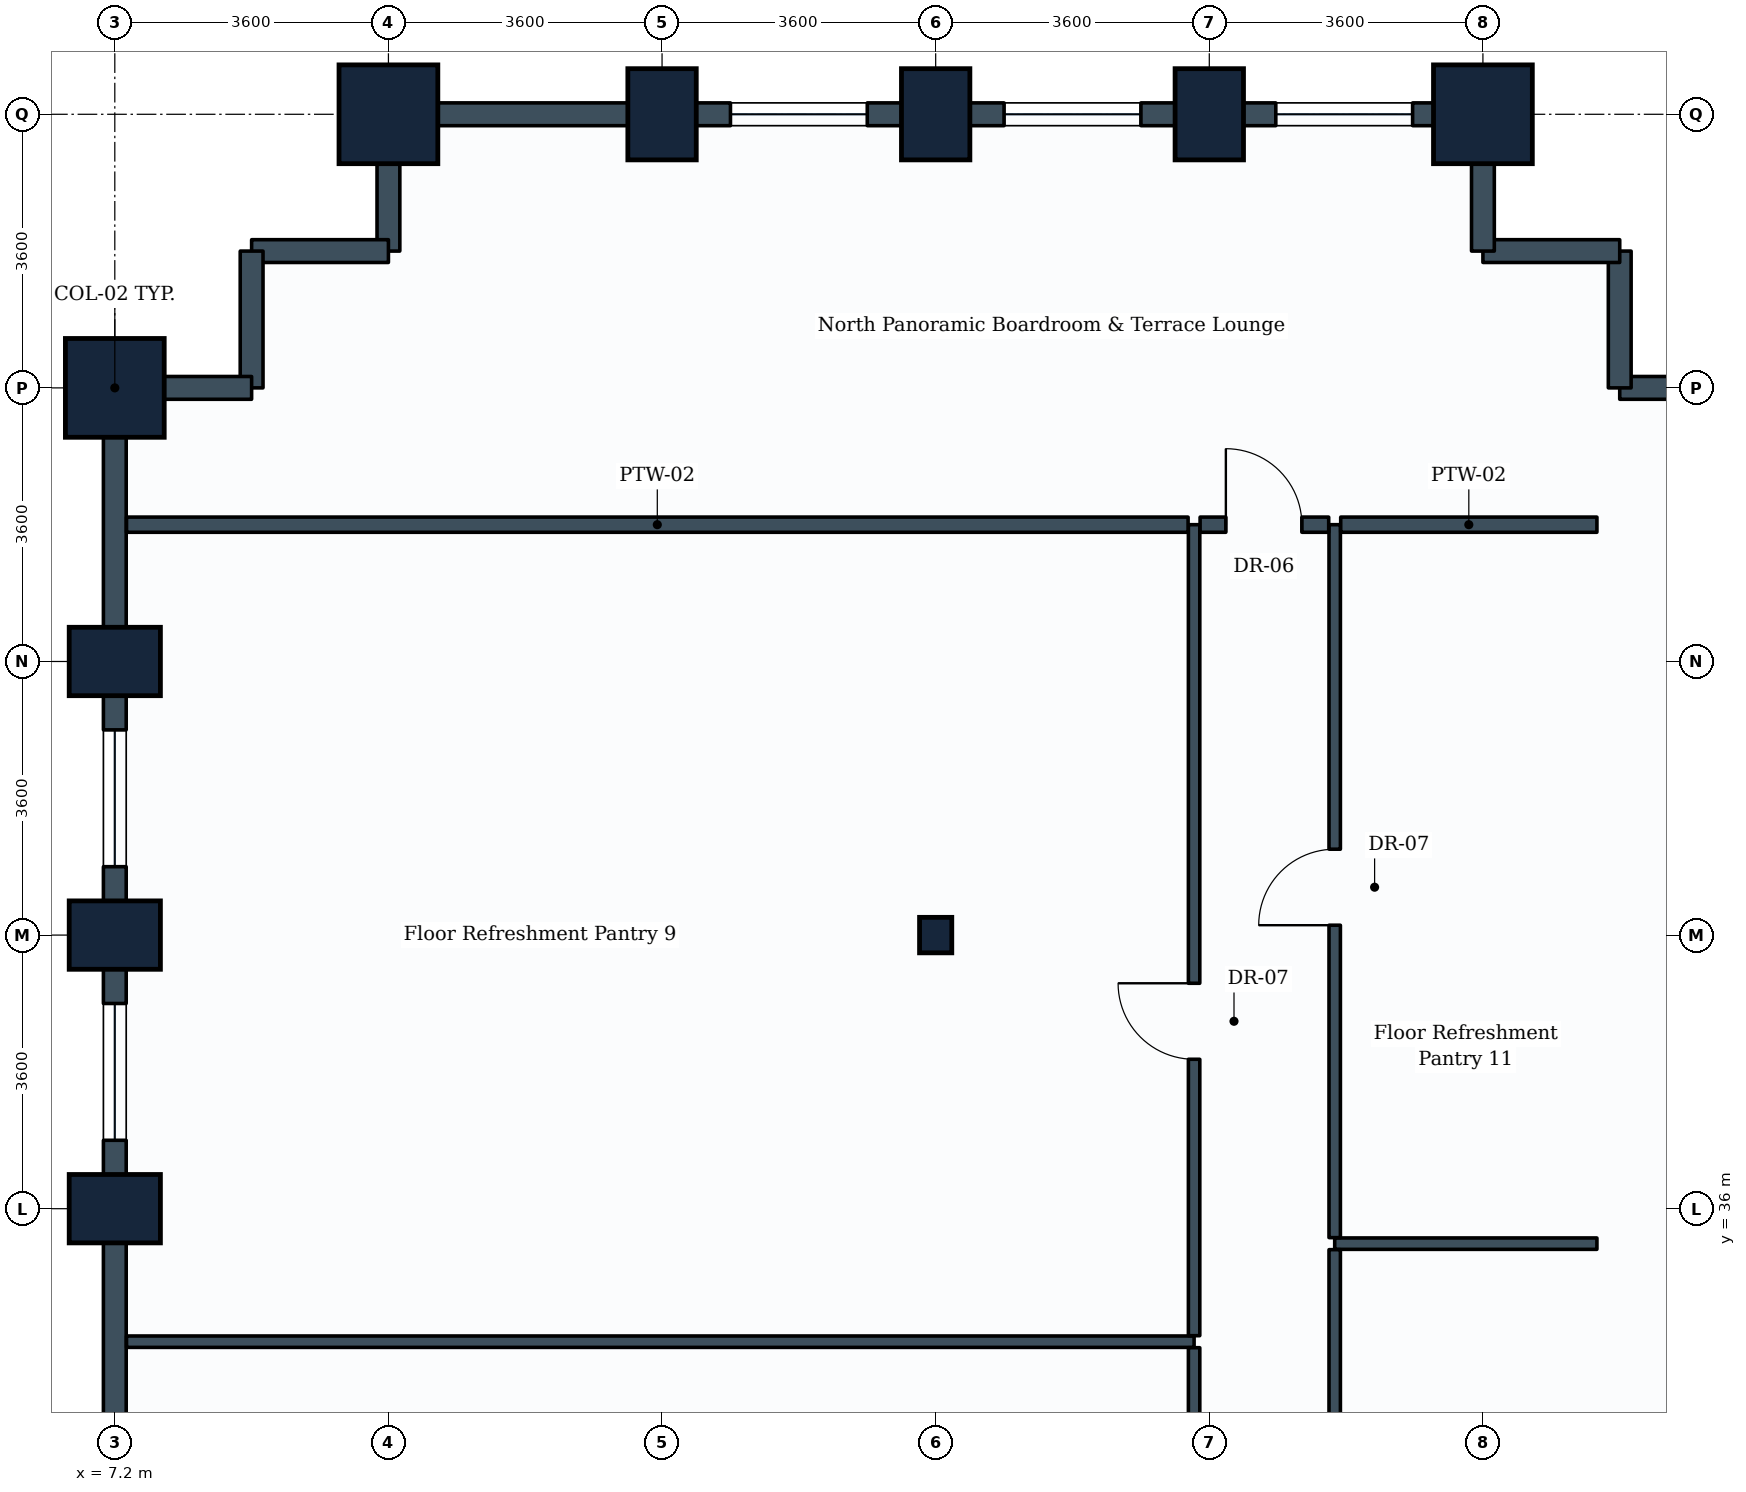
"""IFC4 building model, lengths in metres.
Left out: names, types, materials, properties, quantities, classifications, styles, units other than length and angle.
Written with IfcOpenShell. Run it as: python <this file> out.ifc"""

import sys

from ifc_helpers import new_model, si_unit, direction, frame, frame_2d, origin, origin_2d, place, context, subcontext, project, spatial, rectangle, i_section, extrude, element, fill, save


model = new_model("IFC4")
c1 = context("Model", 3, precision=1e-05, world=origin(), true_north=direction((0.0, 1.0)))
c2 = subcontext(c1, "Body", "Model", "MODEL_VIEW")
j1 = project(units=[si_unit("LENGTHUNIT", "METRE"), si_unit("PLANEANGLEUNIT", "RADIAN")], contexts=[c1])
p1 = place(None, origin())
s1 = spatial("IfcSite", under=j1, at=p1, CompositionType="ELEMENT")
p2 = place(p1, origin())
s2 = spatial("IfcBuilding", under=s1, at=p2, CompositionType="ELEMENT")
p3 = place(p2, frame((0.0, 0.0, 39.6)))
s3 = spatial("IfcBuildingStorey", under=s2, at=p3, CompositionType="ELEMENT", Elevation=39.6)
for number, where, z_axis, x_axis in (
    (1, (7.2, 36.0, 0.0), (0.0, 0.0, 1.0), (0.0, 1.0, 0.0)),
    (2, (7.2, 39.6, 0.0), (0.0, 0.0, 1.0), (0.0, 1.0, 0.0)),
    (3, (7.2, 43.2, 0.0), (0.0, 0.0, 1.0), (0.0, 1.0, 0.0)),
):
    element("IfcColumn", number, at=place(p3, frame(where, z_axis=z_axis, x_axis=x_axis)), inside=s3, PredefinedType="COLUMN", context=c2, shape_type="SweptSolid", body=[
        extrude(rectangle(XDim=0.9, YDim=1.2, at=origin_2d()), origin(), (0.0, 0.0, 1.0), 3.9),
    ])
for number, where, z_axis, x_axis in (
    (4, (7.2, 46.8, 0.0), (0.0, 0.0, 1.0), (0.0, 1.0, 0.0)),
    (5, (10.8, 50.4, 0.0), (0.0, 0.0, 1.0), (1.0, 0.0, 0.0)),
):
    element("IfcColumn", number, at=place(p3, frame(where, z_axis=z_axis, x_axis=x_axis)), inside=s3, PredefinedType="COLUMN", context=c2, shape_type="SweptSolid", body=[
        extrude(rectangle(XDim=1.3, YDim=1.3, at=origin_2d()), origin(), (0.0, 0.0, 1.0), 3.9),
    ])
p4 = place(p3, frame((14.4, 50.4, 0.0), z_axis=(0.0, 0.0, 1.0), x_axis=(1.0, 0.0, 0.0)))
e6 = element("IfcColumn", 6, at=p4, inside=s3, PredefinedType="COLUMN", context=c2, shape_type="SweptSolid", body=[
    extrude(rectangle(XDim=0.9, YDim=1.2, at=origin_2d()), origin(), (0.0, 0.0, 1.0), 3.9),
])
p5 = place(p3, frame((18.0, 39.6, 0.0), z_axis=(0.0, 0.0, 1.0), x_axis=(1.0, 0.0, 0.0)))
e7 = element("IfcColumn", 7, at=p5, inside=s3, PredefinedType="COLUMN", context=c2, shape_type="SweptSolid", body=[
    extrude(i_section(OverallWidth=0.424, OverallDepth=0.467, WebThickness=0.033, FlangeThickness=0.053, FilletRadius=0.015, at=origin_2d()), origin(), (0.0, 0.0, 1.0), 3.9),
])
for number, where, z_axis, x_axis in (
    (8, (18.0, 50.4, 0.0), (0.0, 0.0, 1.0), (1.0, 0.0, 0.0)),
    (9, (21.6, 50.4, 0.0), (0.0, 0.0, 1.0), (1.0, 0.0, 0.0)),
):
    element("IfcColumn", number, at=place(p3, frame(where, z_axis=z_axis, x_axis=x_axis)), inside=s3, PredefinedType="COLUMN", context=c2, shape_type="SweptSolid", body=[
        extrude(rectangle(XDim=0.9, YDim=1.2, at=origin_2d()), origin(), (0.0, 0.0, 1.0), 3.9),
    ])
p6 = place(p3, frame((25.2, 50.4, 0.0), z_axis=(0.0, 0.0, 1.0), x_axis=(1.0, 0.0, 0.0)))
e10 = element("IfcColumn", 10, at=p6, inside=s3, PredefinedType="COLUMN", context=c2, shape_type="SweptSolid", body=[
    extrude(rectangle(XDim=1.3, YDim=1.3, at=origin_2d()), origin(), (0.0, 0.0, 1.0), 3.9),
])
p7 = place(p3, frame((27.0, 46.8, 0.0), z_axis=(0.0, 0.0, 1.0), x_axis=(1.0, 0.0, 0.0)))
e11 = element("IfcWall", 11, at=p7, inside=s3, PredefinedType="STANDARD", context=c2, shape_type="SweptSolid", body=[
    extrude(rectangle(XDim=1.8, YDim=0.3, at=frame_2d((0.9, 0.0))), origin(), (0.0, 0.0, 1.0), 2.93),
])
for number, where, z_axis, x_axis in (
    (12, (27.0, 46.8, 0.0), (0.0, 0.0, 1.0), (0.0, 1.0, 0.0)),
    (13, (25.2, 48.6, 0.0), (0.0, 0.0, 1.0), (1.0, 0.0, 0.0)),
):
    element("IfcWall", number, at=place(p3, frame(where, z_axis=z_axis, x_axis=x_axis)), inside=s3, PredefinedType="STANDARD", context=c2, shape_type="SweptSolid", body=[
        extrude(rectangle(XDim=1.8, YDim=0.3, at=frame_2d((0.9, 0.0))), origin(), (0.0, 0.0, 1.0), 3.635),
    ])
p8 = place(p3, frame((25.2, 48.6, 0.0), z_axis=(0.0, 0.0, 1.0), x_axis=(0.0, 1.0, 0.0)))
e14 = element("IfcWall", 14, at=p8, inside=s3, PredefinedType="STANDARD", context=c2, shape_type="SweptSolid", body=[
    extrude(rectangle(XDim=1.8, YDim=0.3, at=frame_2d((0.9, 0.0))), origin(), (0.0, 0.0, 1.0), 2.93),
])
p9 = place(p3, frame((21.6, 50.4, 0.0), z_axis=(0.0, 0.0, 1.0), x_axis=(1.0, 0.0, 0.0)))
e15 = element("IfcWall", 15, at=p9, inside=s3, PredefinedType="STANDARD", context=c2, shape_type="SweptSolid", body=[
    extrude(rectangle(XDim=3.6, YDim=0.3, at=frame_2d((1.8, 0.0))), origin(), (0.0, 0.0, 1.0), 2.93),
])
p10 = place(p9, frame((0.875, 0.0, 0.85)))
e16 = element("IfcOpeningElement", 16, at=p10, cuts=e15, PredefinedType="OPENING", context=c2, shape_type="SweptSolid", body=[
    extrude(rectangle(XDim=1.8, YDim=1.35, at=frame_2d((0.9, 0.675))), frame((0.0, 0.16, 0.0), z_axis=(0.0, -1.0, 0.0), x_axis=(1.0, 0.0, 0.0)), (0.0, 0.0, 1.0), 0.32),
])
p11 = place(p3, frame((18.0, 50.4, 0.0), z_axis=(0.0, 0.0, 1.0), x_axis=(1.0, 0.0, 0.0)))
e17 = element("IfcWall", 17, at=p11, inside=s3, PredefinedType="STANDARD", context=c2, shape_type="SweptSolid", body=[
    extrude(rectangle(XDim=3.6, YDim=0.3, at=frame_2d((1.8, 0.0))), origin(), (0.0, 0.0, 1.0), 2.93),
])
p12 = place(p11, frame((0.9, 0.0, 0.85)))
e18 = element("IfcOpeningElement", 18, at=p12, cuts=e17, PredefinedType="OPENING", context=c2, shape_type="SweptSolid", body=[
    extrude(rectangle(XDim=1.8, YDim=1.35, at=frame_2d((0.9, 0.675))), frame((0.0, 0.16, 0.0), z_axis=(0.0, -1.0, 0.0), x_axis=(1.0, 0.0, 0.0)), (0.0, 0.0, 1.0), 0.32),
])
p13 = place(p3, frame((14.4, 50.4, 0.0), z_axis=(0.0, 0.0, 1.0), x_axis=(1.0, 0.0, 0.0)))
e19 = element("IfcWall", 19, at=p13, inside=s3, PredefinedType="STANDARD", context=c2, shape_type="SweptSolid", body=[
    extrude(rectangle(XDim=3.6, YDim=0.3, at=frame_2d((1.8, 0.0))), origin(), (0.0, 0.0, 1.0), 2.93),
])
p14 = place(p13, frame((0.9, 0.0, 0.85)))
e20 = element("IfcOpeningElement", 20, at=p14, cuts=e19, PredefinedType="OPENING", context=c2, shape_type="SweptSolid", body=[
    extrude(rectangle(XDim=1.8, YDim=1.35, at=frame_2d((0.9, 0.675))), frame((0.0, 0.16, 0.0), z_axis=(0.0, -1.0, 0.0), x_axis=(1.0, 0.0, 0.0)), (0.0, 0.0, 1.0), 0.32),
])
p15 = place(p3, frame((10.8, 50.4, 0.0), z_axis=(0.0, 0.0, 1.0), x_axis=(1.0, 0.0, 0.0)))
e21 = element("IfcWall", 21, at=p15, inside=s3, PredefinedType="STANDARD", context=c2, shape_type="SweptSolid", body=[
    extrude(rectangle(XDim=3.6, YDim=0.3, at=frame_2d((1.8, 0.0))), origin(), (0.0, 0.0, 1.0), 2.93),
])
p16 = place(p3, frame((10.8, 48.6, 0.0), z_axis=(0.0, 0.0, 1.0), x_axis=(0.0, 1.0, 0.0)))
e22 = element("IfcWall", 22, at=p16, inside=s3, PredefinedType="STANDARD", context=c2, shape_type="SweptSolid", body=[
    extrude(rectangle(XDim=1.8, YDim=0.3, at=frame_2d((0.9, 0.0))), origin(), (0.0, 0.0, 1.0), 2.93),
])
for number, where, z_axis, x_axis in (
    (23, (9.0, 48.6, 0.0), (0.0, 0.0, 1.0), (1.0, 0.0, 0.0)),
    (24, (9.0, 46.8, 0.0), (0.0, 0.0, 1.0), (0.0, 1.0, 0.0)),
):
    element("IfcWall", number, at=place(p3, frame(where, z_axis=z_axis, x_axis=x_axis)), inside=s3, PredefinedType="STANDARD", context=c2, shape_type="SweptSolid", body=[
        extrude(rectangle(XDim=1.8, YDim=0.3, at=frame_2d((0.9, 0.0))), origin(), (0.0, 0.0, 1.0), 3.635),
    ])
p17 = place(p3, frame((7.2, 46.8, 0.0), z_axis=(0.0, 0.0, 1.0), x_axis=(1.0, 0.0, 0.0)))
e25 = element("IfcWall", 25, at=p17, inside=s3, PredefinedType="STANDARD", context=c2, shape_type="SweptSolid", body=[
    extrude(rectangle(XDim=1.8, YDim=0.3, at=frame_2d((0.9, 0.0))), origin(), (0.0, 0.0, 1.0), 2.93),
])
p18 = place(p3, frame((7.2, 43.2, 0.0), z_axis=(0.0, 0.0, 1.0), x_axis=(0.0, 1.0, 0.0)))
e26 = element("IfcWall", 26, at=p18, inside=s3, PredefinedType="STANDARD", context=c2, shape_type="SweptSolid", body=[
    extrude(rectangle(XDim=3.6, YDim=0.3, at=frame_2d((1.8, 0.0))), origin(), (0.0, 0.0, 1.0), 2.93),
])
p19 = place(p3, frame((7.2, 39.6, 0.0), z_axis=(0.0, 0.0, 1.0), x_axis=(0.0, 1.0, 0.0)))
e27 = element("IfcWall", 27, at=p19, inside=s3, PredefinedType="STANDARD", context=c2, shape_type="SweptSolid", body=[
    extrude(rectangle(XDim=3.6, YDim=0.3, at=frame_2d((1.8, 0.0))), origin(), (0.0, 0.0, 1.0), 2.93),
])
p20 = place(p19, frame((0.9, 0.0, 0.85)))
e28 = element("IfcOpeningElement", 28, at=p20, cuts=e27, PredefinedType="OPENING", context=c2, shape_type="SweptSolid", body=[
    extrude(rectangle(XDim=1.8, YDim=1.35, at=frame_2d((0.9, 0.675))), frame((0.0, 0.16, 0.0), z_axis=(0.0, -1.0, 0.0), x_axis=(1.0, 0.0, 0.0)), (0.0, 0.0, 1.0), 0.32),
])
p21 = place(p3, frame((7.2, 36.0, 0.0), z_axis=(0.0, 0.0, 1.0), x_axis=(0.0, 1.0, 0.0)))
e29 = element("IfcWall", 29, at=p21, inside=s3, PredefinedType="STANDARD", context=c2, shape_type="SweptSolid", body=[
    extrude(rectangle(XDim=3.6, YDim=0.3, at=frame_2d((1.8, 0.0))), origin(), (0.0, 0.0, 1.0), 2.93),
])
p22 = place(p21, frame((0.9, 0.0, 0.85)))
e30 = element("IfcOpeningElement", 30, at=p22, cuts=e29, PredefinedType="OPENING", context=c2, shape_type="SweptSolid", body=[
    extrude(rectangle(XDim=1.8, YDim=1.35, at=frame_2d((0.9, 0.675))), frame((0.0, 0.16, 0.0), z_axis=(0.0, -1.0, 0.0), x_axis=(1.0, 0.0, 0.0)), (0.0, 0.0, 1.0), 0.32),
])
p23 = place(p3, frame((7.2, 32.4, 0.0), z_axis=(0.0, 0.0, 1.0), x_axis=(0.0, 1.0, 0.0)))
e31 = element("IfcWall", 31, at=p23, inside=s3, PredefinedType="STANDARD", context=c2, shape_type="SweptSolid", body=[
    extrude(rectangle(XDim=3.6, YDim=0.3, at=frame_2d((1.8, 0.0))), origin(), (0.0, 0.0, 1.0), 2.93),
])
p24 = place(p3, frame((7.354, 34.25, 0.0), z_axis=(0.0, 0.0, 1.0), x_axis=(1.0, 0.0, 0.0)))
e32 = element("IfcWall", 32, at=p24, inside=s3, PredefinedType="PARTITIONING", context=c2, shape_type="SweptSolid", body=[
    extrude(rectangle(XDim=14.046, YDim=0.15, at=frame_2d((7.023, 0.0))), origin(), (0.0, 0.0, 1.0), 2.93),
])
p25 = place(p3, frame((21.4, 26.879, 0.0), z_axis=(0.0, 0.0, 1.0), x_axis=(0.0, 1.0, 0.0)))
e33 = element("IfcWall", 33, at=p25, inside=s3, PredefinedType="PARTITIONING", context=c2, shape_type="SweptSolid", body=[
    extrude(rectangle(XDim=7.292, YDim=0.15, at=frame_2d((3.646, 0.0))), origin(), (0.0, 0.0, 1.0), 3.08),
])
p26 = place(p25, frame((3.146, 0.0, 0.0)))
e34 = element("IfcOpeningElement", 34, at=p26, cuts=e33, PredefinedType="OPENING", context=c2, shape_type="SweptSolid", body=[
    extrude(rectangle(XDim=1.0, YDim=2.1, at=frame_2d((0.5, 1.05))), frame((0.0, 0.085, 0.0), z_axis=(0.0, -1.0, 0.0), x_axis=(1.0, 0.0, 0.0)), (0.0, 0.0, 1.0), 0.17),
])
p27 = place(p3, frame((21.4, 34.329, 0.0), z_axis=(0.0, 0.0, 1.0), x_axis=(0.0, 1.0, 0.0)))
e35 = element("IfcWall", 35, at=p27, inside=s3, PredefinedType="PARTITIONING", context=c2, shape_type="SweptSolid", body=[
    extrude(rectangle(XDim=10.671, YDim=0.15, at=frame_2d((5.335, 0.0))), origin(), (0.0, 0.0, 1.0), 3.03),
])
p28 = place(p27, frame((3.637, 0.0, 0.0)))
e36 = element("IfcOpeningElement", 36, at=p28, cuts=e35, PredefinedType="OPENING", context=c2, shape_type="SweptSolid", body=[
    extrude(rectangle(XDim=1.0, YDim=2.1, at=frame_2d((0.5, 1.05))), frame((0.0, 0.085, 0.0), z_axis=(0.0, -1.0, 0.0), x_axis=(1.0, 0.0, 0.0)), (0.0, 0.0, 1.0), 0.17),
])
p29 = place(p3, frame((23.25, 35.54, 0.0), z_axis=(0.0, 0.0, 1.0), x_axis=(1.0, 0.0, 0.0)))
e37 = element("IfcWall", 37, at=p29, inside=s3, PredefinedType="PARTITIONING", context=c2, shape_type="SweptSolid", body=[
    extrude(rectangle(XDim=3.45, YDim=0.15, at=frame_2d((1.725, 0.0))), origin(), (0.0, 0.0, 1.0), 3.03),
])
p30 = place(p3, frame((23.25, 26.879, 0.0), z_axis=(0.0, 0.0, 1.0), x_axis=(0.0, 1.0, 0.0)))
e38 = element("IfcWall", 38, at=p30, inside=s3, PredefinedType="PARTITIONING", context=c2, shape_type="SweptSolid", body=[
    extrude(rectangle(XDim=8.582, YDim=0.15, at=frame_2d((4.291, 0.0))), origin(), (0.0, 0.0, 1.0), 3.08),
])
p31 = place(p30, frame((3.791, 0.0, 0.0)))
e39 = element("IfcOpeningElement", 39, at=p31, cuts=e38, PredefinedType="OPENING", context=c2, shape_type="SweptSolid", body=[
    extrude(rectangle(XDim=1.0, YDim=2.1, at=frame_2d((0.5, 1.05))), frame((0.0, 0.085, 0.0), z_axis=(0.0, -1.0, 0.0), x_axis=(1.0, 0.0, 0.0)), (0.0, 0.0, 1.0), 0.17),
])
p32 = place(p3, frame((23.25, 35.619, 0.0), z_axis=(0.0, 0.0, 1.0), x_axis=(0.0, 1.0, 0.0)))
e40 = element("IfcWall", 40, at=p32, inside=s3, PredefinedType="PARTITIONING", context=c2, shape_type="SweptSolid", body=[
    extrude(rectangle(XDim=9.381, YDim=0.15, at=frame_2d((4.69, 0.0))), origin(), (0.0, 0.0, 1.0), 3.08),
])
p33 = place(p32, frame((4.111, 0.0, 0.0)))
e41 = element("IfcOpeningElement", 41, at=p33, cuts=e40, PredefinedType="OPENING", context=c2, shape_type="SweptSolid", body=[
    extrude(rectangle(XDim=1.0, YDim=2.1, at=frame_2d((0.5, 1.05))), frame((0.0, 0.085, 0.0), z_axis=(0.0, -1.0, 0.0), x_axis=(1.0, 0.0, 0.0)), (0.0, 0.0, 1.0), 0.17),
])
p34 = place(p3, frame((7.354, 45.0, 0.0), z_axis=(0.0, 0.0, 1.0), x_axis=(1.0, 0.0, 0.0)))
e42 = element("IfcWall", 42, at=p34, inside=s3, PredefinedType="PARTITIONING", context=c2, shape_type="SweptSolid", body=[
    extrude(rectangle(XDim=13.967, YDim=0.2, at=frame_2d((6.983, 0.0))), origin(), (0.0, 0.0, 1.0), 2.93),
])
p35 = place(p3, frame((23.329, 45.0, 0.0), z_axis=(0.0, 0.0, 1.0), x_axis=(1.0, 0.0, 0.0)))
e43 = element("IfcWall", 43, at=p35, inside=s3, PredefinedType="PARTITIONING", context=c2, shape_type="SweptSolid", body=[
    extrude(rectangle(XDim=3.371, YDim=0.2, at=frame_2d((1.686, 0.0))), origin(), (0.0, 0.0, 1.0), 3.635),
])
p36 = place(p3, frame((21.479, 45.0, 0.0), z_axis=(0.0, 0.0, 1.0), x_axis=(1.0, 0.0, 0.0)))
e44 = element("IfcWall", 44, at=p36, inside=s3, PredefinedType="PARTITIONING", context=c2, shape_type="SweptSolid", body=[
    extrude(rectangle(XDim=1.692, YDim=0.2, at=frame_2d((0.846, 0.0))), origin(), (0.0, 0.0, 1.0), 3.635),
])
p37 = place(p36, frame((0.339, 0.0, 0.0)))
e45 = element("IfcOpeningElement", 45, at=p37, cuts=e44, PredefinedType="OPENING", context=c2, shape_type="SweptSolid", body=[
    extrude(rectangle(XDim=1.0, YDim=2.1, at=frame_2d((0.5, 1.05))), frame((0.0, 0.11, 0.0), z_axis=(0.0, -1.0, 0.0), x_axis=(1.0, 0.0, 0.0)), (0.0, 0.0, 1.0), 0.22),
])
p38 = place(p10, origin())
e46 = element("IfcWindow", 46, at=p38, inside=s3, PartitioningType="SINGLE_PANEL", PredefinedType="WINDOW", context=c2, shape_type="SweptSolid", body=[
    extrude(rectangle(XDim=1.8, YDim=1.35, at=frame_2d((0.9, 0.675))), frame((0.0, 0.03, 0.0), z_axis=(0.0, -1.0, 0.0), x_axis=(1.0, 0.0, 0.0)), (0.0, 0.0, 1.0), 0.06),
])
fill(e16, e46)
p39 = place(p12, origin())
e47 = element("IfcWindow", 47, at=p39, inside=s3, PartitioningType="SINGLE_PANEL", PredefinedType="WINDOW", context=c2, shape_type="SweptSolid", body=[
    extrude(rectangle(XDim=1.8, YDim=1.35, at=frame_2d((0.9, 0.675))), frame((0.0, 0.03, 0.0), z_axis=(0.0, -1.0, 0.0), x_axis=(1.0, 0.0, 0.0)), (0.0, 0.0, 1.0), 0.06),
])
fill(e18, e47)
p40 = place(p14, origin())
e48 = element("IfcWindow", 48, at=p40, inside=s3, PartitioningType="SINGLE_PANEL", PredefinedType="WINDOW", context=c2, shape_type="SweptSolid", body=[
    extrude(rectangle(XDim=1.8, YDim=1.35, at=frame_2d((0.9, 0.675))), frame((0.0, 0.03, 0.0), z_axis=(0.0, -1.0, 0.0), x_axis=(1.0, 0.0, 0.0)), (0.0, 0.0, 1.0), 0.06),
])
fill(e20, e48)
p41 = place(p20, origin())
e49 = element("IfcWindow", 49, at=p41, inside=s3, PartitioningType="SINGLE_PANEL", PredefinedType="WINDOW", context=c2, shape_type="SweptSolid", body=[
    extrude(rectangle(XDim=1.8, YDim=1.35, at=frame_2d((0.9, 0.675))), frame((0.0, 0.03, 0.0), z_axis=(0.0, -1.0, 0.0), x_axis=(1.0, 0.0, 0.0)), (0.0, 0.0, 1.0), 0.06),
])
fill(e28, e49)
p42 = place(p22, origin())
e50 = element("IfcWindow", 50, at=p42, inside=s3, PartitioningType="SINGLE_PANEL", PredefinedType="WINDOW", context=c2, shape_type="SweptSolid", body=[
    extrude(rectangle(XDim=1.8, YDim=1.35, at=frame_2d((0.9, 0.675))), frame((0.0, 0.03, 0.0), z_axis=(0.0, -1.0, 0.0), x_axis=(1.0, 0.0, 0.0)), (0.0, 0.0, 1.0), 0.06),
])
fill(e30, e50)
p43 = place(p28, origin())
e51 = element("IfcDoor", 51, at=p43, inside=s3, OperationType="SINGLE_SWING_RIGHT", PredefinedType="DOOR", context=c2, shape_type="SweptSolid", body=[
    extrude(rectangle(XDim=1.0, YDim=2.1, at=frame_2d((0.5, 1.05))), frame((0.0, 0.025, 0.0), z_axis=(0.0, -1.0, 0.0), x_axis=(1.0, 0.0, 0.0)), (0.0, 0.0, 1.0), 0.05),
])
fill(e36, e51)
p44 = place(p33, origin())
e52 = element("IfcDoor", 52, at=p44, inside=s3, OperationType="SINGLE_SWING_LEFT", PredefinedType="DOOR", context=c2, shape_type="SweptSolid", body=[
    extrude(rectangle(XDim=1.0, YDim=2.1, at=frame_2d((0.5, 1.05))), frame((0.0, 0.025, 0.0), z_axis=(0.0, -1.0, 0.0), x_axis=(1.0, 0.0, 0.0)), (0.0, 0.0, 1.0), 0.05),
])
fill(e41, e52)
p45 = place(p37, origin())
e53 = element("IfcDoor", 53, at=p45, inside=s3, OperationType="SINGLE_SWING_LEFT", PredefinedType="DOOR", context=c2, shape_type="SweptSolid", body=[
    extrude(rectangle(XDim=1.0, YDim=2.1, at=frame_2d((0.5, 1.05))), frame((0.0, 0.025, 0.0), z_axis=(0.0, -1.0, 0.0), x_axis=(1.0, 0.0, 0.0)), (0.0, 0.0, 1.0), 0.05),
])
fill(e45, e53)
save(model, sys.argv[1])
